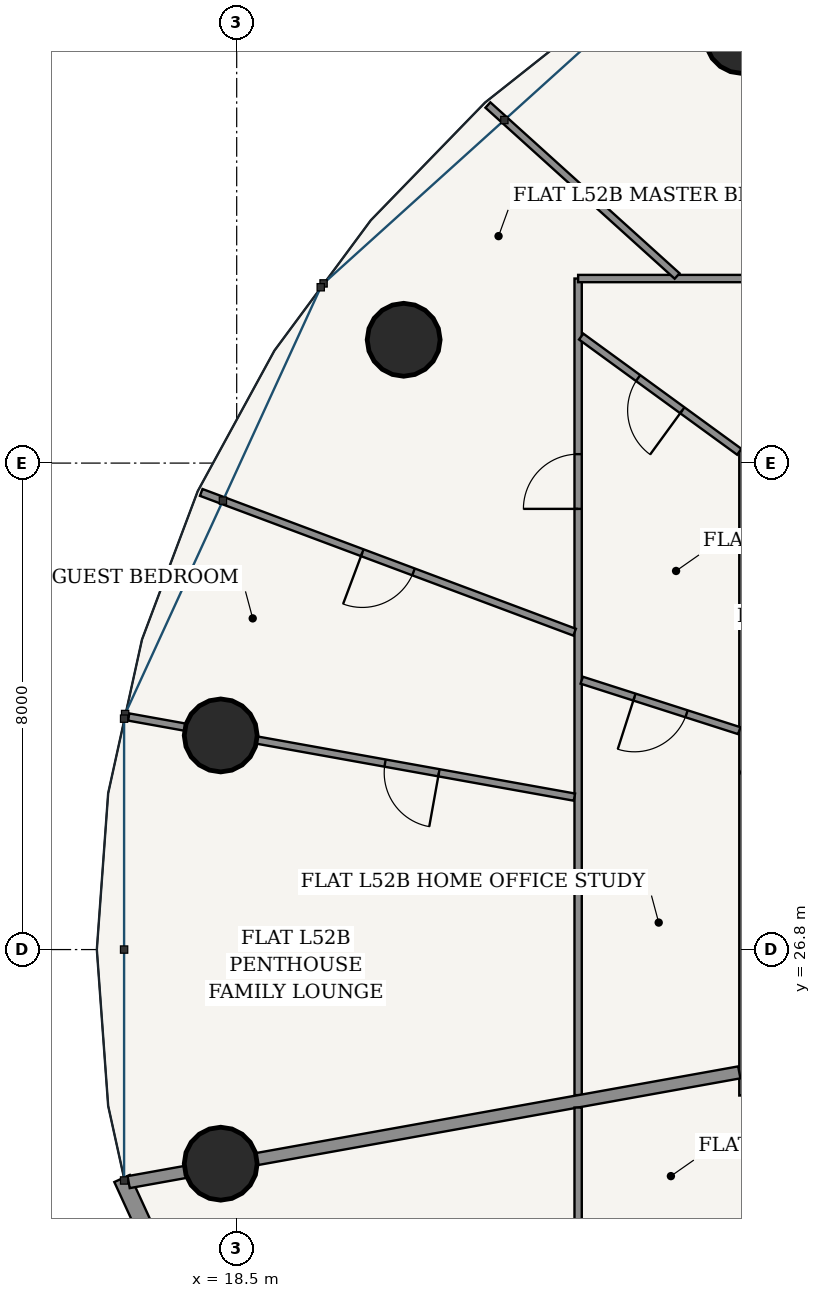
"""IFC4 building model, lengths in metres.
Left out: names, types, materials, properties, quantities, classifications, styles, units other than length and angle.
Written with IfcOpenShell. Run it as: python <this file> out.ifc"""

import sys

from ifc_helpers import new_model, si_unit, direction, frame, frame_2d, origin, origin_2d, place, context, subcontext, project, spatial, rectangle, hollow_circle, extrude, source, transform, mapped, element, fill, save


model = new_model("IFC4")
c1 = context("Model", 3, precision=1e-05, world=origin(), true_north=direction((-0.2419218956, 0.970295726276)))
c2 = subcontext(c1, "Body", "Model", "MODEL_VIEW")
j1 = project(units=[si_unit("LENGTHUNIT", "METRE"), si_unit("PLANEANGLEUNIT", "RADIAN")], contexts=[c1])
p1 = place(None, origin())
s1 = spatial("IfcSite", under=j1, at=p1, CompositionType="ELEMENT")
p2 = place(p1, origin())
s2 = spatial("IfcBuilding", under=s1, at=p2, CompositionType="ELEMENT")
p3 = place(p2, frame((0.0, 0.0, 198.6)))
s3 = spatial("IfcBuildingStorey", under=s2, at=p3, CompositionType="ELEMENT", Elevation=198.6)
for number, where, z_axis, x_axis in (
    (1, (26.805, 41.808, 0.0), (0.0, 0.0, 1.0), (1.0, 0.0, 0.0)),
    (2, (21.246, 36.828, 0.0), (0.0, 0.0, 1.0), (1.0, 0.0, 0.0)),
    (3, (18.237, 30.321, 0.0), (0.0, 0.0, 1.0), (1.0, 0.0, 0.0)),
    (4, (18.237, 23.279, 0.0), (0.0, 0.0, 1.0), (1.0, 0.0, 0.0)),
):
    element("IfcColumn", number, at=place(p3, frame(where, z_axis=z_axis, x_axis=x_axis)), inside=s3, PredefinedType="COLUMN", context=c2, shape_type="SweptSolid", body=[
        extrude(hollow_circle(Radius=0.6, WallThickness=0.038, at=origin_2d()), origin(), (0.0, 0.0, 1.0), 3.7),
    ])
p4 = place(p3, frame((16.615, 23.035, 0.0), z_axis=(0.0, 0.0, 1.0), x_axis=(0.416717018135, -0.909036262641, 0.0)))
e5 = element("IfcWall", 5, at=p4, inside=s3, PredefinedType="SOLIDWALL", context=c2, shape_type="SweptSolid", body=[
    extrude(rectangle(XDim=7.96, YDim=0.28, at=frame_2d((3.98, 0.0))), origin(), (0.0, 0.0, 1.0), 3.435),
])
p5 = place(p4, frame((1.099, 0.0, 0.85)))
e6 = element("IfcOpeningElement", 6, at=p5, cuts=e5, PredefinedType="OPENING", context=c2, shape_type="SweptSolid", body=[
    extrude(rectangle(XDim=2.1, YDim=1.95, at=frame_2d((1.05, 0.975))), frame((0.0, 0.15, 0.0), z_axis=(0.0, -1.0, 0.0), x_axis=(1.0, 0.0, 0.0)), (0.0, 0.0, 1.0), 0.3),
])
p6 = place(p4, frame((4.761, 0.0, 0.85)))
e7 = element("IfcOpeningElement", 7, at=p6, cuts=e5, PredefinedType="OPENING", context=c2, shape_type="SweptSolid", body=[
    extrude(rectangle(XDim=2.1, YDim=1.95, at=frame_2d((1.05, 0.975))), frame((0.0, 0.15, 0.0), z_axis=(0.0, -1.0, 0.0), x_axis=(1.0, 0.0, 0.0)), (0.0, 0.0, 1.0), 0.3),
])
p7 = place(p3, frame((26.845, 24.4, 0.0), z_axis=(0.0, 0.0, 1.0), x_axis=(0.0, 1.0, 0.0)))
e8 = element("IfcWall", 8, at=p7, inside=s3, PredefinedType="PARTITIONING", context=c2, shape_type="SweptSolid", body=[
    extrude(rectangle(XDim=10.625, YDim=0.16, at=frame_2d((5.312, 0.0))), origin(), (0.0, 0.0, 1.0), 2.951),
])
p8 = place(p3, frame((24.115, 24.406, 0.0), z_axis=(0.0, 0.0, 1.0), x_axis=(0.0, 1.0, 0.0)))
e9 = element("IfcWall", 9, at=p8, inside=s3, PredefinedType="PARTITIONING", context=c2, shape_type="SweptSolid", body=[
    extrude(rectangle(XDim=13.429, YDim=0.12, at=frame_2d((6.714, 0.0))), origin(), (0.0, 0.0, 1.0), 2.951),
])
p9 = place(p8, frame((9.641, 0.0, 0.0)))
e10 = element("IfcOpeningElement", 10, at=p9, cuts=e9, PredefinedType="OPENING", context=c2, shape_type="SweptSolid", body=[
    extrude(rectangle(XDim=0.9, YDim=2.15, at=frame_2d((0.45, 1.075))), frame((0.0, 0.07, 0.0), z_axis=(0.0, -1.0, 0.0), x_axis=(1.0, 0.0, 0.0)), (0.0, 0.0, 1.0), 0.14),
])
p10 = place(p3, frame((24.115, 37.835, 0.0), z_axis=(0.0, 0.0, 1.0), x_axis=(1.0, 0.0, 0.0)))
e11 = element("IfcWall", 11, at=p10, inside=s3, PredefinedType="PARTITIONING", context=c2, shape_type="SweptSolid", body=[
    extrude(rectangle(XDim=7.47, YDim=0.12, at=frame_2d((3.735, 0.0))), origin(), (0.0, 0.0, 1.0), 2.951),
])
p11 = place(p10, frame((3.943, 0.0, 0.0)))
e12 = element("IfcOpeningElement", 12, at=p11, cuts=e11, PredefinedType="OPENING", context=c2, shape_type="SweptSolid", body=[
    extrude(rectangle(XDim=0.9, YDim=2.15, at=frame_2d((0.45, 1.075))), frame((0.0, 0.07, 0.0), z_axis=(0.0, -1.0, 0.0), x_axis=(1.0, 0.0, 0.0)), (0.0, 0.0, 1.0), 0.14),
])
p12 = place(p3, frame((25.743, 37.876, 0.0), z_axis=(0.0, 0.0, 1.0), x_axis=(-0.741943837234, 0.670462036502, 0.0)))
e13 = element("IfcWall", 13, at=p12, inside=s3, PredefinedType="PARTITIONING", context=c2, shape_type="SweptSolid", body=[
    extrude(rectangle(XDim=4.194, YDim=0.12, at=frame_2d((2.097, 0.0))), origin(), (0.0, 0.0, 1.0), 2.951),
])
p13 = place(p3, frame((24.057, 32.019, 0.0), z_axis=(0.0, 0.0, 1.0), x_axis=(-0.936540194592, 0.350560214389, 0.0)))
e14 = element("IfcWall", 14, at=p13, inside=s3, PredefinedType="PARTITIONING", context=c2, shape_type="SweptSolid", body=[
    extrude(rectangle(XDim=6.556, YDim=0.12, at=frame_2d((3.278, 0.0))), origin(), (0.0, 0.0, 1.0), 2.951),
])
p14 = place(p13, frame((2.828, 0.0, 0.0)))
e15 = element("IfcOpeningElement", 15, at=p14, cuts=e14, PredefinedType="OPENING", context=c2, shape_type="SweptSolid", body=[
    extrude(rectangle(XDim=0.9, YDim=2.15, at=frame_2d((0.45, 1.075))), frame((0.0, 0.07, 0.0), z_axis=(0.0, -1.0, 0.0), x_axis=(1.0, 0.0, 0.0)), (0.0, 0.0, 1.0), 0.14),
])
p15 = place(p3, frame((24.054, 29.307, 0.0), z_axis=(0.0, 0.0, 1.0), x_axis=(-0.984227185588, 0.176909149424, 0.0)))
e16 = element("IfcWall", 16, at=p15, inside=s3, PredefinedType="PARTITIONING", context=c2, shape_type="SweptSolid", body=[
    extrude(rectangle(XDim=7.448, YDim=0.12, at=frame_2d((3.724, 0.0))), origin(), (0.0, 0.0, 1.0), 2.951),
])
p16 = place(p15, frame((2.264, 0.0, 0.0)))
e17 = element("IfcOpeningElement", 17, at=p16, cuts=e16, PredefinedType="OPENING", context=c2, shape_type="SweptSolid", body=[
    extrude(rectangle(XDim=0.9, YDim=2.15, at=frame_2d((0.45, 1.075))), frame((0.0, 0.07, 0.0), z_axis=(0.0, -1.0, 0.0), x_axis=(1.0, 0.0, 0.0)), (0.0, 0.0, 1.0), 0.14),
])
p17 = place(p3, frame((26.765, 34.986, 0.0), z_axis=(0.0, 0.0, 1.0), x_axis=(-0.808220499107, 0.588879974887, 0.0)))
e18 = element("IfcWall", 18, at=p17, inside=s3, PredefinedType="PARTITIONING", context=c2, shape_type="SweptSolid", body=[
    extrude(rectangle(XDim=3.217, YDim=0.12, at=frame_2d((1.608, 0.0))), origin(), (0.0, 0.0, 1.0), 3.11),
])
p18 = place(p17, frame((1.158, 0.0, 0.0)))
e19 = element("IfcOpeningElement", 19, at=p18, cuts=e18, PredefinedType="OPENING", context=c2, shape_type="SweptSolid", body=[
    extrude(rectangle(XDim=0.9, YDim=2.15, at=frame_2d((0.45, 1.075))), frame((0.0, 0.07, 0.0), z_axis=(0.0, -1.0, 0.0), x_axis=(1.0, 0.0, 0.0)), (0.0, 0.0, 1.0), 0.14),
])
p19 = place(p3, frame((26.765, 30.4, 0.0), z_axis=(0.0, 0.0, 1.0), x_axis=(-0.952315722301, 0.305114347514, 0.0)))
e20 = element("IfcWall", 20, at=p19, inside=s3, PredefinedType="PARTITIONING", context=c2, shape_type="SweptSolid", body=[
    extrude(rectangle(XDim=2.72, YDim=0.12, at=frame_2d((1.36, 0.0))), origin(), (0.0, 0.0, 1.0), 3.435),
])
p20 = place(p19, frame((0.91, 0.0, 0.0)))
e21 = element("IfcOpeningElement", 21, at=p20, cuts=e20, PredefinedType="OPENING", context=c2, shape_type="SweptSolid", body=[
    extrude(rectangle(XDim=0.9, YDim=2.15, at=frame_2d((0.45, 1.075))), frame((0.0, 0.07, 0.0), z_axis=(0.0, -1.0, 0.0), x_axis=(1.0, 0.0, 0.0)), (0.0, 0.0, 1.0), 0.14),
])
p21 = place(p3, frame((26.765, 24.781, 0.0), z_axis=(0.0, 0.0, 1.0), x_axis=(-0.984226684914, -0.176911934879, 0.0)))
e22 = element("IfcWall", 22, at=p21, inside=s3, PredefinedType="PARTITIONING", context=c2, shape_type="SweptSolid", body=[
    extrude(rectangle(XDim=10.202, YDim=0.2, at=frame_2d((5.101, 0.0))), origin(), (0.0, 0.0, 1.0), 2.951),
])
p22 = place(p3, frame((24.115, 21.59, 0.0), z_axis=(0.0, 0.0, 1.0), x_axis=(0.0, 1.0, 0.0)))
e23 = element("IfcWall", 23, at=p22, inside=s3, PredefinedType="PARTITIONING", context=c2, shape_type="SweptSolid", body=[
    extrude(rectangle(XDim=2.612, YDim=0.12, at=frame_2d((1.306, 0.0))), origin(), (0.0, 0.0, 1.0), 3.11),
])
m1 = source(origin(), c2, "Body", "SweptSolid", [
    extrude(rectangle(XDim=0.9, YDim=2.15, at=frame_2d((0.45, 1.075))), frame((0.0, 0.025, 0.0), z_axis=(0.0, -1.0, 0.0), x_axis=(1.0, 0.0, 0.0)), (0.0, 0.0, 1.0), 0.05),
])
p23 = place(p18, origin())
e24 = element("IfcDoor", 24, at=p23, inside=s3, OperationType="SINGLE_SWING_LEFT", PredefinedType="DOOR", context=c2, shape_type="MappedRepresentation", body=[
    mapped(m1, transform((0.0, 0.0, 0.0), scale=1.0)),
])
fill(e19, e24)
p24 = place(p20, origin())
e25 = element("IfcDoor", 25, at=p24, inside=s3, OperationType="SINGLE_SWING_RIGHT", PredefinedType="DOOR", context=c2, shape_type="MappedRepresentation", body=[
    mapped(m1, transform((0.0, 0.0, 0.0), scale=1.0)),
])
fill(e21, e25)
p25 = place(p9, origin())
e26 = element("IfcDoor", 26, at=p25, inside=s3, OperationType="SINGLE_SWING_LEFT", PredefinedType="DOOR", context=c2, shape_type="MappedRepresentation", body=[
    mapped(m1, transform((0.0, 0.0, 0.0), scale=1.0)),
])
fill(e10, e26)
p26 = place(p14, origin())
e27 = element("IfcDoor", 27, at=p26, inside=s3, OperationType="SINGLE_SWING_RIGHT", PredefinedType="DOOR", context=c2, shape_type="MappedRepresentation", body=[
    mapped(m1, transform((0.0, 0.0, 0.0), scale=1.0)),
])
fill(e15, e27)
p27 = place(p16, origin())
e28 = element("IfcDoor", 28, at=p27, inside=s3, OperationType="SINGLE_SWING_LEFT", PredefinedType="DOOR", context=c2, shape_type="MappedRepresentation", body=[
    mapped(m1, transform((0.0, 0.0, 0.0), scale=1.0)),
])
fill(e17, e28)
save(model, sys.argv[1])
